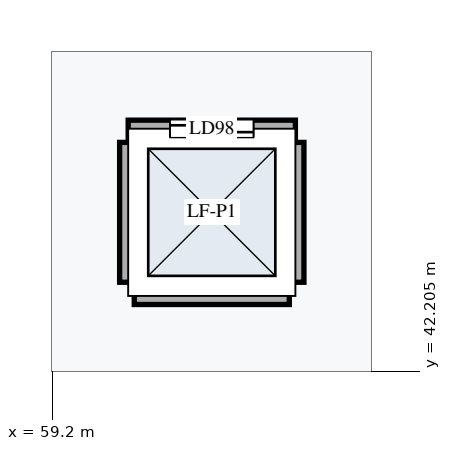
"""IFC4 building model, lengths in metres.
Left out: names, types, materials, properties, quantities, classifications, styles, units other than length and angle.
Written with IfcOpenShell. Run it as: python <this file> out.ifc"""

import sys

from ifc_helpers import new_model, si_unit, direction, frame, frame_2d, origin, place, context, subcontext, project, spatial, rectangle, extrude, element, fill, save


model = new_model("IFC4")
c1 = context("Model", 3, precision=1e-05, world=origin(), true_north=direction((0.0, 1.0)))
c2 = subcontext(c1, "Body", "Model", "MODEL_VIEW")
j1 = project(units=[si_unit("LENGTHUNIT", "METRE"), si_unit("PLANEANGLEUNIT", "RADIAN")], contexts=[c1])
p1 = place(None, origin())
s1 = spatial("IfcSite", under=j1, at=p1, CompositionType="ELEMENT")
p2 = place(p1, origin())
s2 = spatial("IfcBuilding", under=s1, at=p2, CompositionType="ELEMENT")
p3 = place(p2, origin())
s3 = spatial("IfcBuildingStorey", under=s2, at=p3, CompositionType="ELEMENT", Elevation=0.0)
p4 = place(p3, frame((60.2, 45.4, 0.0), z_axis=(0.0, 0.0, 1.0), x_axis=(1.0, 0.0, 0.0)))
e1 = element("IfcWall", 1, at=p4, inside=s3, PredefinedType="STANDARD", context=c2, shape_type="SweptSolid", body=[
    extrude(rectangle(XDim=2.2, YDim=0.225, at=frame_2d((1.1, 0.0))), origin(), (0.0, 0.0, 1.0), 3.92),
])
p5 = place(p4, frame((0.55, 0.0, 0.0)))
e2 = element("IfcOpeningElement", 2, at=p5, cuts=e1, PredefinedType="OPENING", context=c2, shape_type="SweptSolid", body=[
    extrude(rectangle(XDim=1.1, YDim=2.1, at=frame_2d((0.55, 1.05))), frame((0.0, 0.123, 0.0), z_axis=(0.0, -1.0, 0.0), x_axis=(1.0, 0.0, 0.0)), (0.0, 0.0, 1.0), 0.245),
])
p6 = place(p3, frame((60.28, 43.2, 0.0), z_axis=(0.0, 0.0, 1.0), x_axis=(1.0, 0.0, 0.0)))
e3 = element("IfcWall", 3, at=p6, inside=s3, PredefinedType="STANDARD", context=c2, shape_type="SweptSolid", body=[
    extrude(rectangle(XDim=2.04, YDim=0.225, at=frame_2d((1.02, 0.0))), origin(), (0.0, 0.0, 1.0), 3.92),
])
for number, where, z_axis, x_axis in (
    (4, (60.2, 43.38, 0.0), (0.0, 0.0, 1.0), (0.0, 1.0, 0.0)),
    (5, (62.4, 43.38, 0.0), (0.0, 0.0, 1.0), (0.0, 1.0, 0.0)),
):
    element("IfcWall", number, at=place(p3, frame(where, z_axis=z_axis, x_axis=x_axis)), inside=s3, PredefinedType="STANDARD", context=c2, shape_type="SweptSolid", body=[
        extrude(rectangle(XDim=1.84, YDim=0.225, at=frame_2d((0.92, 0.0))), origin(), (0.0, 0.0, 1.0), 3.92),
    ])
p7 = place(p5, origin())
e6 = element("IfcDoor", 6, at=p7, inside=s3, OperationType="DOUBLE_DOOR_SLIDING", PredefinedType="DOOR", context=c2, shape_type="SweptSolid", body=[
    extrude(rectangle(XDim=1.1, YDim=2.1, at=frame_2d((0.55, 1.05))), frame((0.0, 0.025, 0.0), z_axis=(0.0, -1.0, 0.0), x_axis=(1.0, 0.0, 0.0)), (0.0, 0.0, 1.0), 0.05),
])
fill(e2, e6)
save(model, sys.argv[1])
